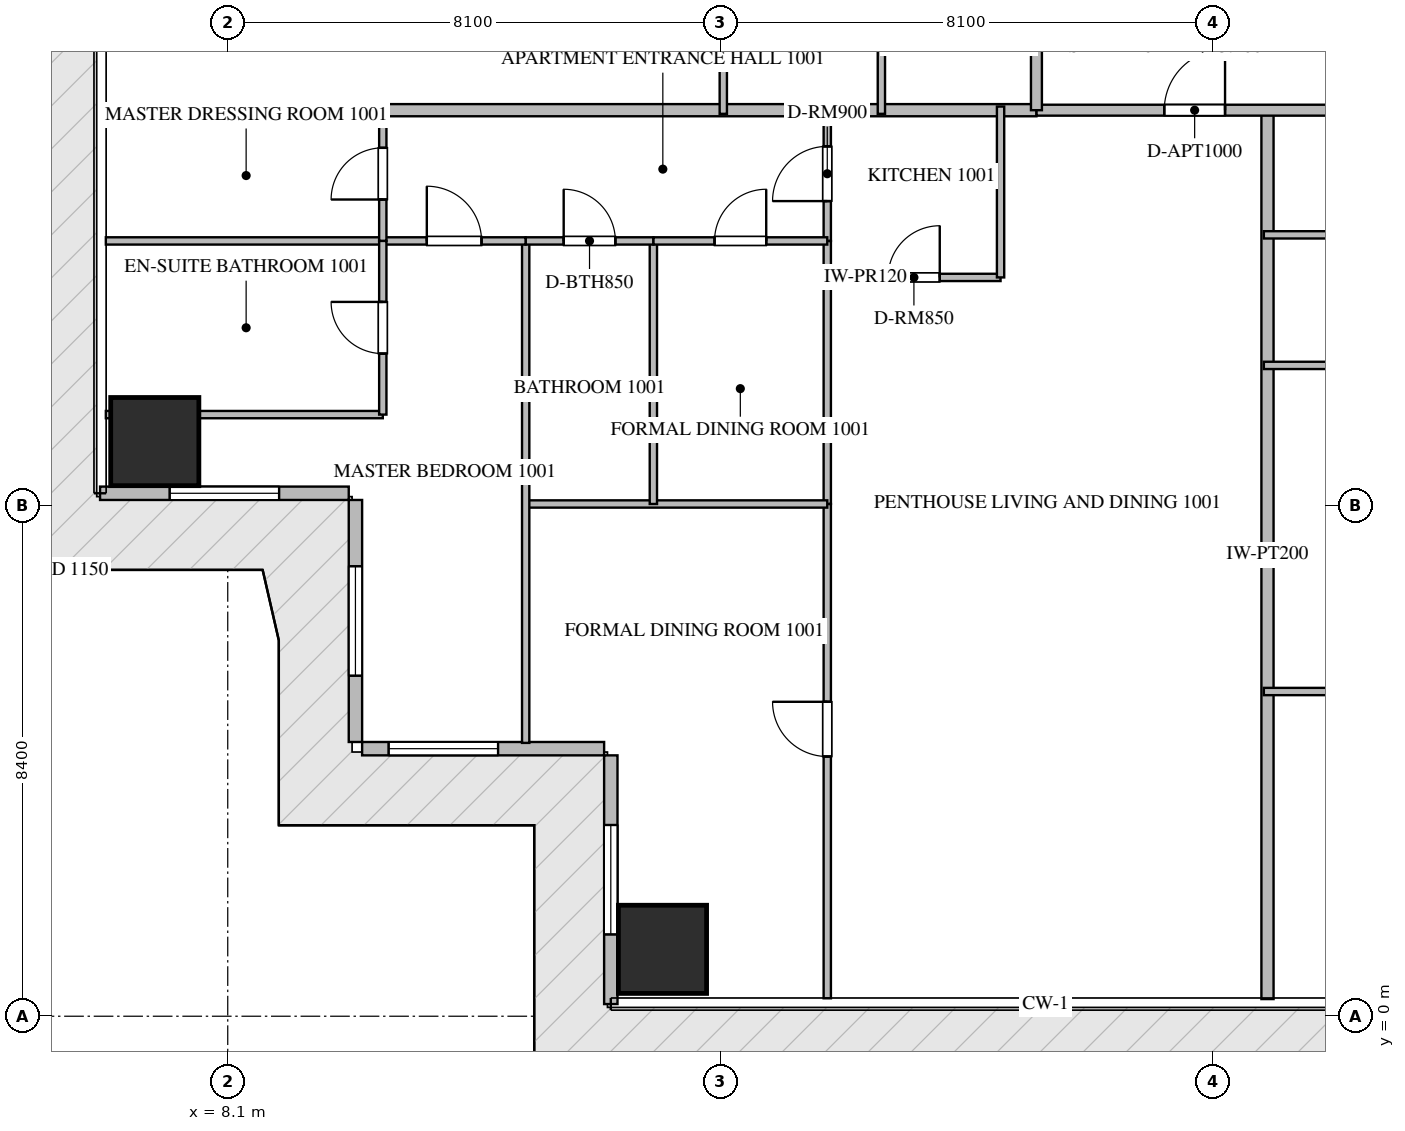
"""IFC4 building model, lengths in metres.
Left out: names, types, materials, properties, quantities, classifications, styles, units other than length and angle.
Written with IfcOpenShell. Run it as: python <this file> out.ifc"""

import sys

from ifc_helpers import new_model, si_unit, direction, frame, frame_2d, origin, origin_2d, place, context, subcontext, project, spatial, rectangle, extrude, source, transform, mapped, element, fill, save


model = new_model("IFC4")
c1 = context("Model", 3, precision=1e-05, world=origin(), true_north=direction((0.0, 1.0)))
c2 = subcontext(c1, "Body", "Model", "MODEL_VIEW")
j1 = project(units=[si_unit("LENGTHUNIT", "METRE"), si_unit("PLANEANGLEUNIT", "RADIAN")], contexts=[c1])
p1 = place(None, origin())
s1 = spatial("IfcSite", under=j1, at=p1, CompositionType="ELEMENT")
p2 = place(p1, origin())
s2 = spatial("IfcBuilding", under=s1, at=p2, CompositionType="ELEMENT")
p3 = place(p2, frame((0.0, 0.0, 45.45)))
s3 = spatial("IfcBuildingStorey", under=s2, at=p3, CompositionType="ELEMENT", Elevation=45.45)
m1 = source(origin(), c2, "Body", "SweptSolid", [
    extrude(rectangle(XDim=1.45, YDim=1.45, at=origin_2d()), origin(), (0.0, 0.0, 1.0), 3.75),
])
for number, where, z_axis, x_axis in (
    (1, (15.25, 1.1, -0.26), (0.0, 0.0, 1.0), (1.0, 0.0, 0.0)),
    (2, (6.9, 9.45, -0.26), (0.0, 0.0, 1.0), (1.0, 0.0, 0.0)),
):
    element("IfcColumn", number, at=place(p3, frame(where, z_axis=z_axis, x_axis=x_axis)), inside=s3, PredefinedType="COLUMN", context=c2, shape_type="MappedRepresentation", body=[
        mapped(m1, transform((0.0, 0.0, 0.0), scale=1.0)),
    ])
p4 = place(p3, frame((6.0, 8.6, 0.0), z_axis=(0.0, 0.0, 1.0), x_axis=(1.0, 0.0, 0.0)))
e3 = element("IfcWall", 3, at=p4, inside=s3, PredefinedType="ELEMENTEDWALL", context=c2, shape_type="SweptSolid", body=[
    extrude(rectangle(XDim=4.09, YDim=0.22, at=frame_2d((2.045, 0.0))), origin(), (0.0, 0.0, 1.0), 3.475),
])
p5 = place(p4, frame((1.145, 0.0, 0.65)))
e4 = element("IfcOpeningElement", 4, at=p5, cuts=e3, PredefinedType="OPENING", context=c2, shape_type="SweptSolid", body=[
    extrude(rectangle(XDim=1.8, YDim=2.1, at=frame_2d((0.9, 1.05))), frame((0.0, 0.12, 0.0), z_axis=(0.0, -1.0, 0.0), x_axis=(1.0, 0.0, 0.0)), (0.0, 0.0, 1.0), 0.24),
])
p6 = place(p3, frame((10.2, 8.49, 0.0), z_axis=(0.0, 0.0, 1.0), x_axis=(0.0, -1.0, 0.0)))
e5 = element("IfcWall", 5, at=p6, inside=s3, PredefinedType="ELEMENTEDWALL", context=c2, shape_type="SweptSolid", body=[
    extrude(rectangle(XDim=3.98, YDim=0.22, at=frame_2d((1.99, 0.0))), origin(), (0.0, 0.0, 1.0), 3.475),
])
p7 = place(p6, frame((1.09, 0.0, 0.65)))
e6 = element("IfcOpeningElement", 6, at=p7, cuts=e5, PredefinedType="OPENING", context=c2, shape_type="SweptSolid", body=[
    extrude(rectangle(XDim=1.8, YDim=2.1, at=frame_2d((0.9, 1.05))), frame((0.0, 0.12, 0.0), z_axis=(0.0, -1.0, 0.0), x_axis=(1.0, 0.0, 0.0)), (0.0, 0.0, 1.0), 0.24),
])
p8 = place(p3, frame((10.31, 4.4, 0.0), z_axis=(0.0, 0.0, 1.0), x_axis=(1.0, 0.0, 0.0)))
e7 = element("IfcWall", 7, at=p8, inside=s3, PredefinedType="ELEMENTEDWALL", context=c2, shape_type="SweptSolid", body=[
    extrude(rectangle(XDim=3.98, YDim=0.22, at=frame_2d((1.99, 0.0))), origin(), (0.0, 0.0, 1.0), 3.475),
])
p9 = place(p8, frame((0.436, 0.0, 0.65)))
e8 = element("IfcOpeningElement", 8, at=p9, cuts=e7, PredefinedType="OPENING", context=c2, shape_type="SweptSolid", body=[
    extrude(rectangle(XDim=1.8, YDim=2.1, at=frame_2d((0.9, 1.05))), frame((0.0, 0.12, 0.0), z_axis=(0.0, -1.0, 0.0), x_axis=(1.0, 0.0, 0.0)), (0.0, 0.0, 1.0), 0.24),
])
p10 = place(p3, frame((14.4, 4.29, 0.0), z_axis=(0.0, 0.0, 1.0), x_axis=(0.0, -1.0, 0.0)))
e9 = element("IfcWall", 9, at=p10, inside=s3, PredefinedType="ELEMENTEDWALL", context=c2, shape_type="SweptSolid", body=[
    extrude(rectangle(XDim=4.09, YDim=0.22, at=frame_2d((2.045, 0.0))), origin(), (0.0, 0.0, 1.0), 3.475),
])
p11 = place(p10, frame((1.145, 0.0, 0.65)))
e10 = element("IfcOpeningElement", 10, at=p11, cuts=e9, PredefinedType="OPENING", context=c2, shape_type="SweptSolid", body=[
    extrude(rectangle(XDim=1.8, YDim=2.1, at=frame_2d((0.9, 1.05))), frame((0.0, 0.12, 0.0), z_axis=(0.0, -1.0, 0.0), x_axis=(1.0, 0.0, 0.0)), (0.0, 0.0, 1.0), 0.24),
])
p12 = place(p3, frame((25.2, 0.282, 0.0), z_axis=(0.0, 0.0, 1.0), x_axis=(0.0, 1.0, 0.0)))
e11 = element("IfcWall", 11, at=p12, inside=s3, PredefinedType="PARTITIONING", context=c2, shape_type="SweptSolid", body=[
    extrude(rectangle(XDim=14.618, YDim=0.2, at=frame_2d((7.309, 0.0))), origin(), (0.0, 0.0, 1.0), 3.49),
])
p13 = place(p3, frame((6.082, 14.9, 0.0), z_axis=(0.0, 0.0, 1.0), x_axis=(1.0, 0.0, 0.0)))
e12 = element("IfcWall", 12, at=p13, inside=s3, PredefinedType="PARTITIONING", context=c2, shape_type="SweptSolid", body=[
    extrude(rectangle(XDim=15.318, YDim=0.2, at=frame_2d((7.659, 0.0))), origin(), (0.0, 0.0, 1.0), 3.49),
])
p14 = place(p3, frame((21.402, 14.9, 0.0), z_axis=(0.0, 0.0, 1.0), x_axis=(1.0, 0.0, 0.0)))
e13 = element("IfcWall", 13, at=p14, inside=s3, PredefinedType="PARTITIONING", context=c2, shape_type="SweptSolid", body=[
    extrude(rectangle(XDim=21.996, YDim=0.18, at=frame_2d((10.998, 0.0))), origin(), (0.0, 0.0, 1.0), 3.49),
])
p15 = place(p14, frame((2.1, 0.0, 0.0)))
e14 = element("IfcOpeningElement", 14, at=p15, cuts=e13, PredefinedType="OPENING", context=c2, shape_type="SweptSolid", body=[
    extrude(rectangle(XDim=1.0, YDim=2.15, at=frame_2d((0.5, 1.075))), frame((0.0, 0.1, 0.0), z_axis=(0.0, -1.0, 0.0), x_axis=(1.0, 0.0, 0.0)), (0.0, 0.0, 1.0), 0.2),
])
p16 = place(p14, frame((14.319, 0.0, 0.0)))
e15 = element("IfcOpeningElement", 15, at=p16, cuts=e13, PredefinedType="OPENING", context=c2, shape_type="SweptSolid", body=[
    extrude(rectangle(XDim=1.0, YDim=2.15, at=frame_2d((0.5, 1.075))), frame((0.0, 0.1, 0.0), z_axis=(0.0, -1.0, 0.0), x_axis=(1.0, 0.0, 0.0)), (0.0, 0.0, 1.0), 0.2),
])
p17 = place(p14, frame((18.896, 0.0, 0.0)))
e16 = element("IfcOpeningElement", 16, at=p17, cuts=e13, PredefinedType="OPENING", context=c2, shape_type="SweptSolid", body=[
    extrude(rectangle(XDim=1.0, YDim=2.15, at=frame_2d((0.5, 1.075))), frame((0.0, 0.1, 0.0), z_axis=(0.0, -1.0, 0.0), x_axis=(1.0, 0.0, 0.0)), (0.0, 0.0, 1.0), 0.2),
])
p18 = place(p3, frame((21.4, 14.9, 0.0), z_axis=(0.0, 0.0, 1.0), x_axis=(0.0, 1.0, 0.0)))
e17 = element("IfcWall", 17, at=p18, inside=s3, PredefinedType="PARTITIONING", context=c2, shape_type="SweptSolid", body=[
    extrude(rectangle(XDim=20.6, YDim=0.18, at=frame_2d((10.3, 0.0))), origin(), (0.0, 0.0, 1.0), 3.49),
])
p19 = place(p18, frame((5.331, 0.0, 0.0)))
e18 = element("IfcOpeningElement", 18, at=p19, cuts=e17, PredefinedType="OPENING", context=c2, shape_type="SweptSolid", body=[
    extrude(rectangle(XDim=1.0, YDim=2.15, at=frame_2d((0.5, 1.075))), frame((0.0, 0.1, 0.0), z_axis=(0.0, -1.0, 0.0), x_axis=(1.0, 0.0, 0.0)), (0.0, 0.0, 1.0), 0.2),
])
p20 = place(p18, frame((10.408, 0.0, 0.0)))
e19 = element("IfcOpeningElement", 19, at=p20, cuts=e17, PredefinedType="OPENING", context=c2, shape_type="SweptSolid", body=[
    extrude(rectangle(XDim=1.0, YDim=2.15, at=frame_2d((0.5, 1.075))), frame((0.0, 0.1, 0.0), z_axis=(0.0, -1.0, 0.0), x_axis=(1.0, 0.0, 0.0)), (0.0, 0.0, 1.0), 0.2),
])
p21 = place(p3, frame((17.96, 12.15, 0.0), z_axis=(0.0, 0.0, 1.0), x_axis=(1.0, 0.0, 0.0)))
e20 = element("IfcWall", 20, at=p21, inside=s3, PredefinedType="PARTITIONING", context=c2, shape_type="SweptSolid", body=[
    extrude(rectangle(XDim=2.85, YDim=0.12, at=frame_2d((1.425, 0.0))), origin(), (0.0, 0.0, 1.0), 3.49),
])
p22 = place(p21, frame((1.0, 0.0, 0.0)))
e21 = element("IfcOpeningElement", 21, at=p22, cuts=e20, PredefinedType="OPENING", context=c2, shape_type="SweptSolid", body=[
    extrude(rectangle(XDim=0.85, YDim=2.1, at=frame_2d((0.425, 1.05))), frame((0.0, 0.07, 0.0), z_axis=(0.0, -1.0, 0.0), x_axis=(1.0, 0.0, 0.0)), (0.0, 0.0, 1.0), 0.14),
])
p23 = place(p3, frame((20.81, 12.15, 0.0), z_axis=(0.0, 0.0, 1.0), x_axis=(0.0, 1.0, 0.0)))
e22 = element("IfcWall", 22, at=p23, inside=s3, PredefinedType="PARTITIONING", context=c2, shape_type="SweptSolid", body=[
    extrude(rectangle(XDim=2.81, YDim=0.12, at=frame_2d((1.405, 0.0))), origin(), (0.0, 0.0, 1.0), 3.49),
])
p24 = place(p3, frame((17.96, 12.75, 0.0), z_axis=(0.0, 0.0, 1.0), x_axis=(0.0, 1.0, 0.0)))
e23 = element("IfcWall", 23, at=p24, inside=s3, PredefinedType="PARTITIONING", context=c2, shape_type="SweptSolid", body=[
    extrude(rectangle(XDim=2.21, YDim=0.12, at=frame_2d((1.105, 0.0))), origin(), (0.0, 0.0, 1.0), 3.49),
])
p25 = place(p24, frame((0.655, 0.0, 0.0)))
e24 = element("IfcOpeningElement", 24, at=p25, cuts=e23, PredefinedType="OPENING", context=c2, shape_type="SweptSolid", body=[
    extrude(rectangle(XDim=0.9, YDim=2.1, at=frame_2d((0.45, 1.05))), frame((0.0, 0.07, 0.0), z_axis=(0.0, -1.0, 0.0), x_axis=(1.0, 0.0, 0.0)), (0.0, 0.0, 1.0), 0.14),
])
p26 = place(p3, frame((17.96, 0.295, 0.0), z_axis=(0.0, 0.0, 1.0), x_axis=(0.0, 1.0, 0.0)))
e25 = element("IfcWall", 25, at=p26, inside=s3, PredefinedType="PARTITIONING", context=c2, shape_type="SweptSolid", body=[
    extrude(rectangle(XDim=8.129, YDim=0.12, at=frame_2d((4.064, 0.0))), origin(), (0.0, 0.0, 1.0), 3.49),
])
p27 = place(p26, frame((3.976, 0.0, 0.0)))
e26 = element("IfcOpeningElement", 26, at=p27, cuts=e25, PredefinedType="OPENING", context=c2, shape_type="SweptSolid", body=[
    extrude(rectangle(XDim=0.9, YDim=2.1, at=frame_2d((0.45, 1.05))), frame((0.0, 0.07, 0.0), z_axis=(0.0, -1.0, 0.0), x_axis=(1.0, 0.0, 0.0)), (0.0, 0.0, 1.0), 0.14),
])
p28 = place(p3, frame((17.96, 8.426, 0.0), z_axis=(0.0, 0.0, 1.0), x_axis=(0.0, 1.0, 0.0)))
e27 = element("IfcWall", 27, at=p28, inside=s3, PredefinedType="PARTITIONING", context=c2, shape_type="SweptSolid", body=[
    extrude(rectangle(XDim=4.322, YDim=0.12, at=frame_2d((2.161, 0.0))), origin(), (0.0, 0.0, 1.0), 3.49),
])
p29 = place(p3, frame((13.0, 8.424, 0.0), z_axis=(0.0, 0.0, 1.0), x_axis=(1.0, 0.0, 0.0)))
e28 = element("IfcWall", 28, at=p29, inside=s3, PredefinedType="PARTITIONING", context=c2, shape_type="SweptSolid", body=[
    extrude(rectangle(XDim=4.96, YDim=0.12, at=frame_2d((2.48, 0.0))), origin(), (0.0, 0.0, 1.0), 3.49),
])
p30 = place(p3, frame((13.0, 4.495, 0.0), z_axis=(0.0, 0.0, 1.0), x_axis=(0.0, 1.0, 0.0)))
e29 = element("IfcWall", 29, at=p30, inside=s3, PredefinedType="PARTITIONING", context=c2, shape_type="SweptSolid", body=[
    extrude(rectangle(XDim=8.255, YDim=0.12, at=frame_2d((4.127, 0.0))), origin(), (0.0, 0.0, 1.0), 3.49),
])
p31 = place(p3, frame((15.1, 8.424, 0.0), z_axis=(0.0, 0.0, 1.0), x_axis=(0.0, 1.0, 0.0)))
e30 = element("IfcWall", 30, at=p31, inside=s3, PredefinedType="PARTITIONING", context=c2, shape_type="SweptSolid", body=[
    extrude(rectangle(XDim=4.326, YDim=0.12, at=frame_2d((2.163, 0.0))), origin(), (0.0, 0.0, 1.0), 2.922),
])
p32 = place(p3, frame((13.0, 12.75, 0.0), z_axis=(0.0, 0.0, 1.0), x_axis=(1.0, 0.0, 0.0)))
e31 = element("IfcWall", 31, at=p32, inside=s3, PredefinedType="PARTITIONING", context=c2, shape_type="SweptSolid", body=[
    extrude(rectangle(XDim=2.1, YDim=0.12, at=frame_2d((1.05, 0.0))), origin(), (0.0, 0.0, 1.0), 3.49),
])
p33 = place(p32, frame((0.625, 0.0, 0.0)))
e32 = element("IfcOpeningElement", 32, at=p33, cuts=e31, PredefinedType="OPENING", context=c2, shape_type="SweptSolid", body=[
    extrude(rectangle(XDim=0.85, YDim=2.1, at=frame_2d((0.425, 1.05))), frame((0.0, 0.07, 0.0), z_axis=(0.0, -1.0, 0.0), x_axis=(1.0, 0.0, 0.0)), (0.0, 0.0, 1.0), 0.14),
])
p34 = place(p3, frame((15.102, 12.75, 0.0), z_axis=(0.0, 0.0, 1.0), x_axis=(1.0, 0.0, 0.0)))
e33 = element("IfcWall", 33, at=p34, inside=s3, PredefinedType="PARTITIONING", context=c2, shape_type="SweptSolid", body=[
    extrude(rectangle(XDim=2.858, YDim=0.12, at=frame_2d((1.429, 0.0))), origin(), (0.0, 0.0, 1.0), 3.49),
])
p35 = place(p34, frame((1.004, 0.0, 0.0)))
e34 = element("IfcOpeningElement", 34, at=p35, cuts=e33, PredefinedType="OPENING", context=c2, shape_type="SweptSolid", body=[
    extrude(rectangle(XDim=0.85, YDim=2.1, at=frame_2d((0.425, 1.05))), frame((0.0, 0.07, 0.0), z_axis=(0.0, -1.0, 0.0), x_axis=(1.0, 0.0, 0.0)), (0.0, 0.0, 1.0), 0.14),
])
p36 = place(p3, frame((10.65, 12.75, 0.0), z_axis=(0.0, 0.0, 1.0), x_axis=(1.0, 0.0, 0.0)))
e35 = element("IfcWall", 35, at=p36, inside=s3, PredefinedType="PARTITIONING", context=c2, shape_type="SweptSolid", body=[
    extrude(rectangle(XDim=2.348, YDim=0.12, at=frame_2d((1.174, 0.0))), origin(), (0.0, 0.0, 1.0), 3.49),
])
p37 = place(p36, frame((0.724, 0.0, 0.0)))
e36 = element("IfcOpeningElement", 36, at=p37, cuts=e35, PredefinedType="OPENING", context=c2, shape_type="SweptSolid", body=[
    extrude(rectangle(XDim=0.9, YDim=2.1, at=frame_2d((0.45, 1.05))), frame((0.0, 0.07, 0.0), z_axis=(0.0, -1.0, 0.0), x_axis=(1.0, 0.0, 0.0)), (0.0, 0.0, 1.0), 0.14),
])
p38 = place(p3, frame((6.095, 9.894, 0.0), z_axis=(0.0, 0.0, 1.0), x_axis=(1.0, 0.0, 0.0)))
e37 = element("IfcWall", 37, at=p38, inside=s3, PredefinedType="PARTITIONING", context=c2, shape_type="SweptSolid", body=[
    extrude(rectangle(XDim=4.555, YDim=0.12, at=frame_2d((2.277, 0.0))), origin(), (0.0, 0.0, 1.0), 3.49),
])
p39 = place(p3, frame((6.095, 12.75, 0.0), z_axis=(0.0, 0.0, 1.0), x_axis=(1.0, 0.0, 0.0)))
e38 = element("IfcWall", 38, at=p39, inside=s3, PredefinedType="PARTITIONING", context=c2, shape_type="SweptSolid", body=[
    extrude(rectangle(XDim=4.553, YDim=0.12, at=frame_2d((2.276, 0.0))), origin(), (0.0, 0.0, 1.0), 3.49),
])
p40 = place(p3, frame((10.65, 9.894, 0.0), z_axis=(0.0, 0.0, 1.0), x_axis=(0.0, 1.0, 0.0)))
e39 = element("IfcWall", 39, at=p40, inside=s3, PredefinedType="PARTITIONING", context=c2, shape_type="SweptSolid", body=[
    extrude(rectangle(XDim=2.856, YDim=0.12, at=frame_2d((1.428, 0.0))), origin(), (0.0, 0.0, 1.0), 3.49),
])
p41 = place(p40, frame((1.003, 0.0, 0.0)))
e40 = element("IfcOpeningElement", 40, at=p41, cuts=e39, PredefinedType="OPENING", context=c2, shape_type="SweptSolid", body=[
    extrude(rectangle(XDim=0.85, YDim=2.1, at=frame_2d((0.425, 1.05))), frame((0.0, 0.07, 0.0), z_axis=(0.0, -1.0, 0.0), x_axis=(1.0, 0.0, 0.0)), (0.0, 0.0, 1.0), 0.14),
])
p42 = place(p3, frame((10.65, 12.752, 0.0), z_axis=(0.0, 0.0, 1.0), x_axis=(0.0, 1.0, 0.0)))
e41 = element("IfcWall", 41, at=p42, inside=s3, PredefinedType="PARTITIONING", context=c2, shape_type="SweptSolid", body=[
    extrude(rectangle(XDim=2.208, YDim=0.12, at=frame_2d((1.104, 0.0))), origin(), (0.0, 0.0, 1.0), 3.49),
])
p43 = place(p42, frame((0.679, 0.0, 0.0)))
e42 = element("IfcOpeningElement", 42, at=p43, cuts=e41, PredefinedType="OPENING", context=c2, shape_type="SweptSolid", body=[
    extrude(rectangle(XDim=0.85, YDim=2.1, at=frame_2d((0.425, 1.05))), frame((0.0, 0.07, 0.0), z_axis=(0.0, -1.0, 0.0), x_axis=(1.0, 0.0, 0.0)), (0.0, 0.0, 1.0), 0.14),
])
for number, where, z_axis, x_axis in (
    (43, (25.14, 5.34, 0.0), (0.0, 0.0, 1.0), (1.0, 0.0, 0.0)),
    (44, (25.14, 10.703, 0.0), (0.0, 0.0, 1.0), (1.0, 0.0, 0.0)),
    (45, (25.14, 12.85, 0.0), (0.0, 0.0, 1.0), (1.0, 0.0, 0.0)),
):
    element("IfcWall", number, at=place(p3, frame(where, z_axis=z_axis, x_axis=x_axis)), inside=s3, PredefinedType="PARTITIONING", context=c2, shape_type="SweptSolid", body=[
        extrude(rectangle(XDim=8.49, YDim=0.12, at=frame_2d((4.245, 0.0))), origin(), (0.0, 0.0, 1.0), 3.49),
    ])
for number, where, z_axis, x_axis in (
    (46, (18.85, 14.84, 0.0), (0.0, 0.0, 1.0), (0.0, 1.0, 0.0)),
    (47, (16.25, 14.84, 0.0), (0.0, 0.0, 1.0), (0.0, 1.0, 0.0)),
):
    element("IfcWall", number, at=place(p3, frame(where, z_axis=z_axis, x_axis=x_axis)), inside=s3, PredefinedType="PARTITIONING", context=c2, shape_type="SweptSolid", body=[
        extrude(rectangle(XDim=2.81, YDim=0.12, at=frame_2d((1.405, 0.0))), origin(), (0.0, 0.0, 1.0), 3.49),
    ])
m2 = source(origin(), c2, "Body", "SweptSolid", [
    extrude(rectangle(XDim=1.8, YDim=2.1, at=frame_2d((0.9, 1.05))), frame((0.0, 0.03, 0.0), z_axis=(0.0, -1.0, 0.0), x_axis=(1.0, 0.0, 0.0)), (0.0, 0.0, 1.0), 0.06),
])
p44 = place(p5, origin())
e48 = element("IfcWindow", 48, at=p44, inside=s3, PartitioningType="SINGLE_PANEL", PredefinedType="WINDOW", context=c2, shape_type="MappedRepresentation", body=[
    mapped(m2, transform((0.0, 0.0, 0.0), scale=1.0)),
])
fill(e4, e48)
p45 = place(p7, origin())
e49 = element("IfcWindow", 49, at=p45, inside=s3, PartitioningType="SINGLE_PANEL", PredefinedType="WINDOW", context=c2, shape_type="MappedRepresentation", body=[
    mapped(m2, transform((0.0, 0.0, 0.0), scale=1.0)),
])
fill(e6, e49)
p46 = place(p9, origin())
e50 = element("IfcWindow", 50, at=p46, inside=s3, PartitioningType="SINGLE_PANEL", PredefinedType="WINDOW", context=c2, shape_type="MappedRepresentation", body=[
    mapped(m2, transform((0.0, 0.0, 0.0), scale=1.0)),
])
fill(e8, e50)
p47 = place(p11, origin())
e51 = element("IfcWindow", 51, at=p47, inside=s3, PartitioningType="SINGLE_PANEL", PredefinedType="WINDOW", context=c2, shape_type="MappedRepresentation", body=[
    mapped(m2, transform((0.0, 0.0, 0.0), scale=1.0)),
])
fill(e10, e51)
m3 = source(origin(), c2, "Body", "SweptSolid", [
    extrude(rectangle(XDim=1.0, YDim=2.15, at=frame_2d((0.5, 1.075))), frame((0.0, 0.025, 0.0), z_axis=(0.0, -1.0, 0.0), x_axis=(1.0, 0.0, 0.0)), (0.0, 0.0, 1.0), 0.05),
])
p48 = place(p15, origin())
e52 = element("IfcDoor", 52, at=p48, inside=s3, OperationType="SINGLE_SWING_RIGHT", PredefinedType="DOOR", context=c2, shape_type="MappedRepresentation", body=[
    mapped(m3, transform((0.0, 0.0, 0.0), scale=1.0)),
])
fill(e14, e52)
m4 = source(origin(), c2, "Body", "SweptSolid", [
    extrude(rectangle(XDim=0.85, YDim=2.1, at=frame_2d((0.425, 1.05))), frame((0.0, 0.025, 0.0), z_axis=(0.0, -1.0, 0.0), x_axis=(1.0, 0.0, 0.0)), (0.0, 0.0, 1.0), 0.05),
])
p49 = place(p22, origin())
e53 = element("IfcDoor", 53, at=p49, inside=s3, OperationType="SINGLE_SWING_RIGHT", PredefinedType="DOOR", context=c2, shape_type="MappedRepresentation", body=[
    mapped(m4, transform((0.0, 0.0, 0.0), scale=1.0)),
])
fill(e21, e53)
m5 = source(origin(), c2, "Body", "SweptSolid", [
    extrude(rectangle(XDim=0.9, YDim=2.1, at=frame_2d((0.45, 1.05))), frame((0.0, 0.025, 0.0), z_axis=(0.0, -1.0, 0.0), x_axis=(1.0, 0.0, 0.0)), (0.0, 0.0, 1.0), 0.05),
])
p50 = place(p25, origin())
e54 = element("IfcDoor", 54, at=p50, inside=s3, OperationType="SINGLE_SWING_LEFT", PredefinedType="DOOR", context=c2, shape_type="MappedRepresentation", body=[
    mapped(m5, transform((0.0, 0.0, 0.0), scale=1.0)),
])
fill(e24, e54)
p51 = place(p27, origin())
e55 = element("IfcDoor", 55, at=p51, inside=s3, OperationType="SINGLE_SWING_RIGHT", PredefinedType="DOOR", context=c2, shape_type="MappedRepresentation", body=[
    mapped(m5, transform((0.0, 0.0, 0.0), scale=1.0)),
])
fill(e26, e55)
p52 = place(p33, origin())
e56 = element("IfcDoor", 56, at=p52, inside=s3, OperationType="SINGLE_SWING_LEFT", PredefinedType="DOOR", context=c2, shape_type="MappedRepresentation", body=[
    mapped(m4, transform((0.0, 0.0, 0.0), scale=1.0)),
])
fill(e32, e56)
p53 = place(p35, origin())
e57 = element("IfcDoor", 57, at=p53, inside=s3, OperationType="SINGLE_SWING_RIGHT", PredefinedType="DOOR", context=c2, shape_type="MappedRepresentation", body=[
    mapped(m4, transform((0.0, 0.0, 0.0), scale=1.0)),
])
fill(e34, e57)
p54 = place(p37, origin())
e58 = element("IfcDoor", 58, at=p54, inside=s3, OperationType="SINGLE_SWING_LEFT", PredefinedType="DOOR", context=c2, shape_type="MappedRepresentation", body=[
    mapped(m5, transform((0.0, 0.0, 0.0), scale=1.0)),
])
fill(e36, e58)
p55 = place(p41, origin())
e59 = element("IfcDoor", 59, at=p55, inside=s3, OperationType="SINGLE_SWING_RIGHT", PredefinedType="DOOR", context=c2, shape_type="MappedRepresentation", body=[
    mapped(m4, transform((0.0, 0.0, 0.0), scale=1.0)),
])
fill(e40, e59)
p56 = place(p43, origin())
e60 = element("IfcDoor", 60, at=p56, inside=s3, OperationType="SINGLE_SWING_LEFT", PredefinedType="DOOR", context=c2, shape_type="MappedRepresentation", body=[
    mapped(m4, transform((0.0, 0.0, 0.0), scale=1.0)),
])
fill(e42, e60)
save(model, sys.argv[1])
